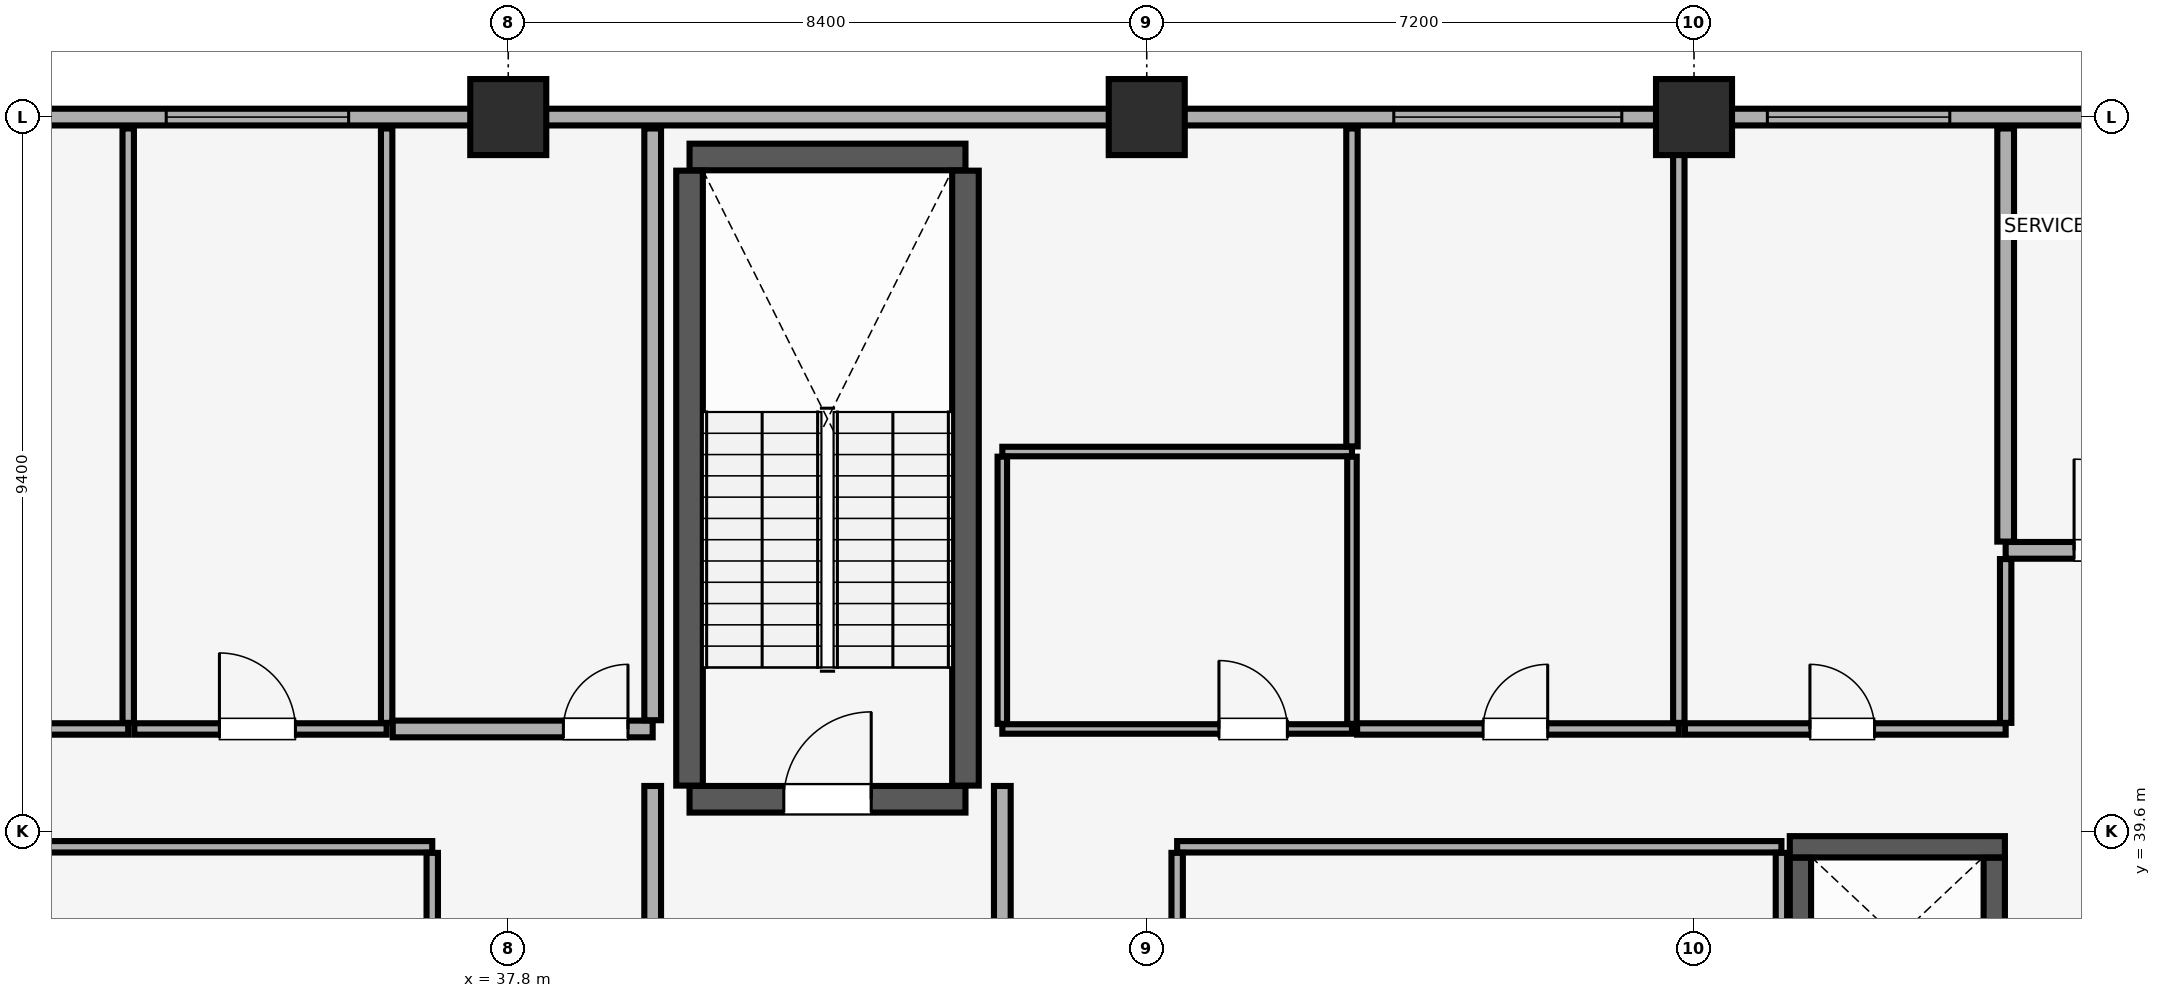
"""IFC4 building model, lengths in metres.
Left out: names, types, materials, properties, quantities, classifications, styles, units other than length and angle.
Written with IfcOpenShell. Run it as: python <this file> out.ifc"""

import sys

from ifc_helpers import new_model, si_unit, direction, frame, frame_2d, origin, origin_2d, place, context, subcontext, project, spatial, rectangle, extrude, element, fill, save


model = new_model("IFC4")
c1 = context("Model", 3, precision=1e-05, world=origin(), true_north=direction((0.0, 1.0)))
c2 = subcontext(c1, "Body", "Model", "MODEL_VIEW")
j1 = project(units=[si_unit("LENGTHUNIT", "METRE"), si_unit("PLANEANGLEUNIT", "RADIAN")], contexts=[c1])
p1 = place(None, origin())
s1 = spatial("IfcSite", under=j1, at=p1, CompositionType="ELEMENT")
p2 = place(p1, origin())
s2 = spatial("IfcBuilding", under=s1, at=p2, CompositionType="ELEMENT")
p3 = place(p2, frame((0.0, 0.0, 290.3)))
s3 = spatial("IfcBuildingStorey", under=s2, at=p3, CompositionType="ELEMENT", Elevation=290.3)
for number, where, z_axis, x_axis in (
    (1, (37.8, 49.0, 0.0), (0.0, 0.0, 1.0), (1.0, 0.0, 0.0)),
    (2, (46.2, 49.0, 0.0), (0.0, 0.0, 1.0), (1.0, 0.0, 0.0)),
    (3, (53.4, 49.0, 0.0), (0.0, 0.0, 1.0), (1.0, 0.0, 0.0)),
):
    element("IfcColumn", number, at=place(p3, frame(where, z_axis=z_axis, x_axis=x_axis)), inside=s3, PredefinedType="COLUMN", context=c2, shape_type="SweptSolid", body=[
        extrude(rectangle(XDim=1.0, YDim=1.0, at=origin_2d()), origin(), (0.0, 0.0, 1.0), 4.02),
    ])
p4 = place(p3, frame((71.4, 49.0, 0.0), z_axis=(0.0, 0.0, 1.0), x_axis=(-1.0, 0.0, 0.0)))
e4 = element("IfcWall", 4, at=p4, inside=s3, PredefinedType="SOLIDWALL", context=c2, shape_type="SweptSolid", body=[
    extrude(rectangle(XDim=58.8, YDim=0.22, at=frame_2d((29.4, 0.0))), origin(), (0.0, 0.0, 1.0), 3.22),
])
p5 = place(p4, frame((56.365, 0.0, 0.85)))
e5 = element("IfcOpeningElement", 5, at=p5, cuts=e4, PredefinedType="OPENING", context=c2, shape_type="SweptSolid", body=[
    extrude(rectangle(XDim=1.5, YDim=1.4, at=frame_2d((0.75, 0.7))), frame((0.0, 0.12, 0.0), z_axis=(0.0, -1.0, 0.0), x_axis=(1.0, 0.0, 0.0)), (0.0, 0.0, 1.0), 0.24),
])
p6 = place(p4, frame((0.935, 0.0, 0.85)))
e6 = element("IfcOpeningElement", 6, at=p6, cuts=e4, PredefinedType="OPENING", context=c2, shape_type="SweptSolid", body=[
    extrude(rectangle(XDim=1.5, YDim=1.4, at=frame_2d((0.75, 0.7))), frame((0.0, 0.12, 0.0), z_axis=(0.0, -1.0, 0.0), x_axis=(1.0, 0.0, 0.0)), (0.0, 0.0, 1.0), 0.24),
])
p7 = place(p4, frame((41.915, 0.0, 0.9)))
e7 = element("IfcOpeningElement", 7, at=p7, cuts=e4, PredefinedType="OPENING", context=c2, shape_type="SweptSolid", body=[
    extrude(rectangle(XDim=3.6, YDim=1.5, at=frame_2d((1.8, 0.75))), frame((0.0, 0.12, 0.0), z_axis=(0.0, -1.0, 0.0), x_axis=(1.0, 0.0, 0.0)), (0.0, 0.0, 1.0), 0.24),
])
p8 = place(p4, frame((35.7, 0.0, 0.9)))
e8 = element("IfcOpeningElement", 8, at=p8, cuts=e4, PredefinedType="OPENING", context=c2, shape_type="SweptSolid", body=[
    extrude(rectangle(XDim=2.4, YDim=1.5, at=frame_2d((1.2, 0.75))), frame((0.0, 0.12, 0.0), z_axis=(0.0, -1.0, 0.0), x_axis=(1.0, 0.0, 0.0)), (0.0, 0.0, 1.0), 0.24),
])
p9 = place(p4, frame((18.95, 0.0, 0.9)))
e9 = element("IfcOpeningElement", 9, at=p9, cuts=e4, PredefinedType="OPENING", context=c2, shape_type="SweptSolid", body=[
    extrude(rectangle(XDim=3.0, YDim=1.5, at=frame_2d((1.5, 0.75))), frame((0.0, 0.12, 0.0), z_axis=(0.0, -1.0, 0.0), x_axis=(1.0, 0.0, 0.0)), (0.0, 0.0, 1.0), 0.24),
])
p10 = place(p4, frame((14.635, 0.0, 0.9)))
e10 = element("IfcOpeningElement", 10, at=p10, cuts=e4, PredefinedType="OPENING", context=c2, shape_type="SweptSolid", body=[
    extrude(rectangle(XDim=2.4, YDim=1.5, at=frame_2d((1.2, 0.75))), frame((0.0, 0.12, 0.0), z_axis=(0.0, -1.0, 0.0), x_axis=(1.0, 0.0, 0.0)), (0.0, 0.0, 1.0), 0.24),
])
p11 = place(p3, frame((40.185, 40.025, 0.0), z_axis=(0.0, 0.0, 1.0), x_axis=(1.0, 0.0, 0.0)))
e11 = element("IfcWall", 11, at=p11, inside=s3, PredefinedType="SHEAR", context=c2, shape_type="SweptSolid", body=[
    extrude(rectangle(XDim=3.63, YDim=0.35, at=frame_2d((1.815, 0.0))), origin(), (0.0, 0.0, 1.0), 4.02),
])
p12 = place(p11, frame((1.24, 0.0, 0.0)))
e12 = element("IfcOpeningElement", 12, at=p12, cuts=e11, PredefinedType="OPENING", context=c2, shape_type="SweptSolid", body=[
    extrude(rectangle(XDim=1.15, YDim=2.15, at=frame_2d((0.575, 1.075))), frame((0.0, 0.185, 0.0), z_axis=(0.0, -1.0, 0.0), x_axis=(1.0, 0.0, 0.0)), (0.0, 0.0, 1.0), 0.37),
])
p13 = place(p3, frame((40.185, 48.475, 0.0), z_axis=(0.0, 0.0, 1.0), x_axis=(1.0, 0.0, 0.0)))
e13 = element("IfcWall", 13, at=p13, inside=s3, PredefinedType="SHEAR", context=c2, shape_type="SweptSolid", body=[
    extrude(rectangle(XDim=3.63, YDim=0.35, at=frame_2d((1.815, 0.0))), origin(), (0.0, 0.0, 1.0), 4.02),
])
for number, where, z_axis, x_axis in (
    (14, (40.185, 40.205, 0.0), (0.0, 0.0, 1.0), (0.0, 1.0, 0.0)),
    (15, (43.815, 40.205, 0.0), (0.0, 0.0, 1.0), (0.0, 1.0, 0.0)),
):
    element("IfcWall", number, at=place(p3, frame(where, z_axis=z_axis, x_axis=x_axis)), inside=s3, PredefinedType="SHEAR", context=c2, shape_type="SweptSolid", body=[
        extrude(rectangle(XDim=8.09, YDim=0.35, at=frame_2d((4.045, 0.0))), origin(), (0.0, 0.0, 1.0), 4.02),
    ])
p14 = place(p3, frame((54.66, 39.4, 0.0), z_axis=(0.0, 0.0, 1.0), x_axis=(1.0, 0.0, 0.0)))
e16 = element("IfcWall", 16, at=p14, inside=s3, PredefinedType="SHEAR", context=c2, shape_type="SweptSolid", body=[
    extrude(rectangle(XDim=2.83, YDim=0.28, at=frame_2d((1.415, 0.0))), origin(), (0.0, 0.0, 1.0), 4.02),
])
for number, where, z_axis, x_axis in (
    (17, (54.8, 37.145, 0.0), (0.0, 0.0, 1.0), (0.0, 1.0, 0.0)),
    (18, (57.35, 37.145, 0.0), (0.0, 0.0, 1.0), (0.0, 1.0, 0.0)),
):
    element("IfcWall", number, at=place(p3, frame(where, z_axis=z_axis, x_axis=x_axis)), inside=s3, PredefinedType="SHEAR", context=c2, shape_type="SweptSolid", body=[
        extrude(rectangle(XDim=2.11, YDim=0.28, at=frame_2d((1.055, 0.0))), origin(), (0.0, 0.0, 1.0), 4.02),
    ])
for number, where, z_axis, x_axis in (
    (19, (39.7, 34.415, 0.0), (0.0, 0.0, 1.0), (0.0, 1.0, 0.0)),
    (20, (44.3, 34.415, 0.0), (0.0, 0.0, 1.0), (0.0, 1.0, 0.0)),
):
    element("IfcWall", number, at=place(p3, frame(where, z_axis=z_axis, x_axis=x_axis)), inside=s3, PredefinedType="PARTITIONING", context=c2, shape_type="SweptSolid", body=[
        extrude(rectangle(XDim=5.785, YDim=0.22, at=frame_2d((2.893, 0.0))), origin(), (0.0, 0.0, 1.0), 4.02),
    ])
p15 = place(p3, frame((57.5, 43.3, 0.0), z_axis=(0.0, 0.0, 1.0), x_axis=(1.0, 0.0, 0.0)))
e21 = element("IfcWall", 21, at=p15, inside=s3, PredefinedType="PARTITIONING", context=c2, shape_type="SweptSolid", body=[
    extrude(rectangle(XDim=3.04, YDim=0.22, at=frame_2d((1.52, 0.0))), origin(), (0.0, 0.0, 1.0), 4.02),
])
p16 = place(p15, frame((0.9, 0.0, 0.0)))
e22 = element("IfcOpeningElement", 22, at=p16, cuts=e21, PredefinedType="OPENING", context=c2, shape_type="SweptSolid", body=[
    extrude(rectangle(XDim=1.2, YDim=2.15, at=frame_2d((0.6, 1.075))), frame((0.0, 0.12, 0.0), z_axis=(0.0, -1.0, 0.0), x_axis=(1.0, 0.0, 0.0)), (0.0, 0.0, 1.0), 0.24),
])
p17 = place(p3, frame((57.5, 43.415, 0.0), z_axis=(0.0, 0.0, 1.0), x_axis=(0.0, 1.0, 0.0)))
e23 = element("IfcWall", 23, at=p17, inside=s3, PredefinedType="PARTITIONING", context=c2, shape_type="SweptSolid", body=[
    extrude(rectangle(XDim=5.435, YDim=0.22, at=frame_2d((2.718, 0.0))), origin(), (0.0, 0.0, 1.0), 4.02),
])
p18 = place(p3, frame((31.6, 39.4, 0.0), z_axis=(0.0, 0.0, 1.0), x_axis=(1.0, 0.0, 0.0)))
e24 = element("IfcWall", 24, at=p18, inside=s3, PredefinedType="PARTITIONING", context=c2, shape_type="SweptSolid", body=[
    extrude(rectangle(XDim=5.2, YDim=0.15, at=frame_2d((2.6, 0.0))), origin(), (0.0, 0.0, 1.0), 4.02),
])
p19 = place(p3, frame((36.8, 34.38, 0.0), z_axis=(0.0, 0.0, 1.0), x_axis=(0.0, 1.0, 0.0)))
e25 = element("IfcWall", 25, at=p19, inside=s3, PredefinedType="PARTITIONING", context=c2, shape_type="SweptSolid", body=[
    extrude(rectangle(XDim=4.94, YDim=0.15, at=frame_2d((2.47, 0.0))), origin(), (0.0, 0.0, 1.0), 4.02),
])
p20 = place(p3, frame((46.6, 39.4, 0.0), z_axis=(0.0, 0.0, 1.0), x_axis=(1.0, 0.0, 0.0)))
e26 = element("IfcWall", 26, at=p20, inside=s3, PredefinedType="PARTITIONING", context=c2, shape_type="SweptSolid", body=[
    extrude(rectangle(XDim=7.95, YDim=0.15, at=frame_2d((3.975, 0.0))), origin(), (0.0, 0.0, 1.0), 4.02),
])
for number, where, z_axis, x_axis in (
    (27, (46.6, 34.38, 0.0), (0.0, 0.0, 1.0), (0.0, 1.0, 0.0)),
    (28, (54.55, 34.38, 0.0), (0.0, 0.0, 1.0), (0.0, 1.0, 0.0)),
):
    element("IfcWall", number, at=place(p3, frame(where, z_axis=z_axis, x_axis=x_axis)), inside=s3, PredefinedType="PARTITIONING", context=c2, shape_type="SweptSolid", body=[
        extrude(rectangle(XDim=4.94, YDim=0.15, at=frame_2d((2.47, 0.0))), origin(), (0.0, 0.0, 1.0), 4.02),
    ])
p21 = place(p3, frame((25.0, 40.95, 0.0), z_axis=(0.0, 0.0, 1.0), x_axis=(1.0, 0.0, 0.0)))
e29 = element("IfcWall", 29, at=p21, inside=s3, PredefinedType="PARTITIONING", context=c2, shape_type="SweptSolid", body=[
    extrude(rectangle(XDim=7.8, YDim=0.15, at=frame_2d((3.9, 0.0))), origin(), (0.0, 0.0, 1.0), 4.02),
])
p22 = place(p21, frame((3.475, 0.0, 0.0)))
e30 = element("IfcOpeningElement", 30, at=p22, cuts=e29, PredefinedType="OPENING", context=c2, shape_type="SweptSolid", body=[
    extrude(rectangle(XDim=0.85, YDim=2.1, at=frame_2d((0.425, 1.05))), frame((0.0, 0.085, 0.0), z_axis=(0.0, -1.0, 0.0), x_axis=(1.0, 0.0, 0.0)), (0.0, 0.0, 1.0), 0.17),
])
p23 = place(p3, frame((32.8, 41.03, 0.0), z_axis=(0.0, 0.0, 1.0), x_axis=(0.0, 1.0, 0.0)))
e31 = element("IfcWall", 31, at=p23, inside=s3, PredefinedType="PARTITIONING", context=c2, shape_type="SweptSolid", body=[
    extrude(rectangle(XDim=7.82, YDim=0.15, at=frame_2d((3.91, 0.0))), origin(), (0.0, 0.0, 1.0), 4.02),
])
p24 = place(p3, frame((32.88, 40.95, 0.0), z_axis=(0.0, 0.0, 1.0), x_axis=(1.0, 0.0, 0.0)))
e32 = element("IfcWall", 32, at=p24, inside=s3, PredefinedType="PARTITIONING", context=c2, shape_type="SweptSolid", body=[
    extrude(rectangle(XDim=3.32, YDim=0.15, at=frame_2d((1.66, 0.0))), origin(), (0.0, 0.0, 1.0), 4.02),
])
p25 = place(p24, frame((1.12, 0.0, 0.0)))
e33 = element("IfcOpeningElement", 33, at=p25, cuts=e32, PredefinedType="OPENING", context=c2, shape_type="SweptSolid", body=[
    extrude(rectangle(XDim=1.0, YDim=2.15, at=frame_2d((0.5, 1.075))), frame((0.0, 0.085, 0.0), z_axis=(0.0, -1.0, 0.0), x_axis=(1.0, 0.0, 0.0)), (0.0, 0.0, 1.0), 0.17),
])
p26 = place(p3, frame((36.2, 41.03, 0.0), z_axis=(0.0, 0.0, 1.0), x_axis=(0.0, 1.0, 0.0)))
e34 = element("IfcWall", 34, at=p26, inside=s3, PredefinedType="PARTITIONING", context=c2, shape_type="SweptSolid", body=[
    extrude(rectangle(XDim=7.82, YDim=0.15, at=frame_2d((3.91, 0.0))), origin(), (0.0, 0.0, 1.0), 4.02),
])
p27 = place(p3, frame((36.28, 40.95, 0.0), z_axis=(0.0, 0.0, 1.0), x_axis=(1.0, 0.0, 0.0)))
e35 = element("IfcWall", 35, at=p27, inside=s3, PredefinedType="PARTITIONING", context=c2, shape_type="SweptSolid", body=[
    extrude(rectangle(XDim=3.42, YDim=0.22, at=frame_2d((1.71, 0.0))), origin(), (0.0, 0.0, 1.0), 4.02),
])
p28 = place(p27, frame((2.245, 0.0, 0.0)))
e36 = element("IfcOpeningElement", 36, at=p28, cuts=e35, PredefinedType="OPENING", context=c2, shape_type="SweptSolid", body=[
    extrude(rectangle(XDim=0.85, YDim=2.1, at=frame_2d((0.425, 1.05))), frame((0.0, 0.12, 0.0), z_axis=(0.0, -1.0, 0.0), x_axis=(1.0, 0.0, 0.0)), (0.0, 0.0, 1.0), 0.24),
])
p29 = place(p3, frame((39.7, 41.065, 0.0), z_axis=(0.0, 0.0, 1.0), x_axis=(0.0, 1.0, 0.0)))
e37 = element("IfcWall", 37, at=p29, inside=s3, PredefinedType="PARTITIONING", context=c2, shape_type="SweptSolid", body=[
    extrude(rectangle(XDim=7.785, YDim=0.22, at=frame_2d((3.893, 0.0))), origin(), (0.0, 0.0, 1.0), 4.02),
])
p30 = place(p3, frame((44.3, 40.95, 0.0), z_axis=(0.0, 0.0, 1.0), x_axis=(1.0, 0.0, 0.0)))
e38 = element("IfcWall", 38, at=p30, inside=s3, PredefinedType="PARTITIONING", context=c2, shape_type="SweptSolid", body=[
    extrude(rectangle(XDim=4.6, YDim=0.125, at=frame_2d((2.3, 0.0))), origin(), (0.0, 0.0, 1.0), 4.02),
])
p31 = place(p30, frame((2.85, 0.0, 0.0)))
e39 = element("IfcOpeningElement", 39, at=p31, cuts=e38, PredefinedType="OPENING", context=c2, shape_type="SweptSolid", body=[
    extrude(rectangle(XDim=0.9, YDim=2.1, at=frame_2d((0.45, 1.05))), frame((0.0, 0.073, 0.0), z_axis=(0.0, -1.0, 0.0), x_axis=(1.0, 0.0, 0.0)), (0.0, 0.0, 1.0), 0.145),
])
p32 = place(p3, frame((44.3, 44.6, 0.0), z_axis=(0.0, 0.0, 1.0), x_axis=(1.0, 0.0, 0.0)))
e40 = element("IfcWall", 40, at=p32, inside=s3, PredefinedType="PARTITIONING", context=c2, shape_type="SweptSolid", body=[
    extrude(rectangle(XDim=4.6, YDim=0.125, at=frame_2d((2.3, 0.0))), origin(), (0.0, 0.0, 1.0), 4.02),
])
for number, where, z_axis, x_axis in (
    (41, (44.3, 41.018, 0.0), (0.0, 0.0, 1.0), (0.0, 1.0, 0.0)),
    (42, (48.9, 41.018, 0.0), (0.0, 0.0, 1.0), (0.0, 1.0, 0.0)),
):
    element("IfcWall", number, at=place(p3, frame(where, z_axis=z_axis, x_axis=x_axis)), inside=s3, PredefinedType="PARTITIONING", context=c2, shape_type="SweptSolid", body=[
        extrude(rectangle(XDim=3.515, YDim=0.125, at=frame_2d((1.757, 0.0))), origin(), (0.0, 0.0, 1.0), 4.02),
    ])
p33 = place(p3, frame((48.968, 40.95, 0.0), z_axis=(0.0, 0.0, 1.0), x_axis=(1.0, 0.0, 0.0)))
e43 = element("IfcWall", 43, at=p33, inside=s3, PredefinedType="PARTITIONING", context=c2, shape_type="SweptSolid", body=[
    extrude(rectangle(XDim=4.232, YDim=0.15, at=frame_2d((2.116, 0.0))), origin(), (0.0, 0.0, 1.0), 4.02),
])
p34 = place(p33, frame((1.657, 0.0, 0.0)))
e44 = element("IfcOpeningElement", 44, at=p34, cuts=e43, PredefinedType="OPENING", context=c2, shape_type="SweptSolid", body=[
    extrude(rectangle(XDim=0.85, YDim=2.1, at=frame_2d((0.425, 1.05))), frame((0.0, 0.085, 0.0), z_axis=(0.0, -1.0, 0.0), x_axis=(1.0, 0.0, 0.0)), (0.0, 0.0, 1.0), 0.17),
])
p35 = place(p3, frame((48.9, 44.667, 0.0), z_axis=(0.0, 0.0, 1.0), x_axis=(0.0, 1.0, 0.0)))
e45 = element("IfcWall", 45, at=p35, inside=s3, PredefinedType="PARTITIONING", context=c2, shape_type="SweptSolid", body=[
    extrude(rectangle(XDim=4.183, YDim=0.15, at=frame_2d((2.091, 0.0))), origin(), (0.0, 0.0, 1.0), 4.02),
])
p36 = place(p3, frame((53.2, 41.03, 0.0), z_axis=(0.0, 0.0, 1.0), x_axis=(0.0, 1.0, 0.0)))
e46 = element("IfcWall", 46, at=p36, inside=s3, PredefinedType="PARTITIONING", context=c2, shape_type="SweptSolid", body=[
    extrude(rectangle(XDim=7.82, YDim=0.15, at=frame_2d((3.91, 0.0))), origin(), (0.0, 0.0, 1.0), 4.02),
])
p37 = place(p3, frame((53.28, 40.95, 0.0), z_axis=(0.0, 0.0, 1.0), x_axis=(1.0, 0.0, 0.0)))
e47 = element("IfcWall", 47, at=p37, inside=s3, PredefinedType="PARTITIONING", context=c2, shape_type="SweptSolid", body=[
    extrude(rectangle(XDim=4.22, YDim=0.15, at=frame_2d((2.11, 0.0))), origin(), (0.0, 0.0, 1.0), 4.02),
])
p38 = place(p37, frame((1.645, 0.0, 0.0)))
e48 = element("IfcOpeningElement", 48, at=p38, cuts=e47, PredefinedType="OPENING", context=c2, shape_type="SweptSolid", body=[
    extrude(rectangle(XDim=0.85, YDim=2.1, at=frame_2d((0.425, 1.05))), frame((0.0, 0.085, 0.0), z_axis=(0.0, -1.0, 0.0), x_axis=(1.0, 0.0, 0.0)), (0.0, 0.0, 1.0), 0.17),
])
p39 = place(p3, frame((57.5, 41.03, 0.0), z_axis=(0.0, 0.0, 1.0), x_axis=(0.0, 1.0, 0.0)))
e49 = element("IfcWall", 49, at=p39, inside=s3, PredefinedType="PARTITIONING", context=c2, shape_type="SweptSolid", body=[
    extrude(rectangle(XDim=2.155, YDim=0.15, at=frame_2d((1.078, 0.0))), origin(), (0.0, 0.0, 1.0), 4.02),
])
p40 = place(p8, origin())
e50 = element("IfcWindow", 50, at=p40, inside=s3, PartitioningType="SINGLE_PANEL", PredefinedType="WINDOW", context=c2, shape_type="SweptSolid", body=[
    extrude(rectangle(XDim=2.4, YDim=1.5, at=frame_2d((1.2, 0.75))), frame((0.0, 0.03, 0.0), z_axis=(0.0, -1.0, 0.0), x_axis=(1.0, 0.0, 0.0)), (0.0, 0.0, 1.0), 0.06),
])
fill(e8, e50)
p41 = place(p9, origin())
e51 = element("IfcWindow", 51, at=p41, inside=s3, PartitioningType="SINGLE_PANEL", PredefinedType="WINDOW", context=c2, shape_type="SweptSolid", body=[
    extrude(rectangle(XDim=3.0, YDim=1.5, at=frame_2d((1.5, 0.75))), frame((0.0, 0.03, 0.0), z_axis=(0.0, -1.0, 0.0), x_axis=(1.0, 0.0, 0.0)), (0.0, 0.0, 1.0), 0.06),
])
fill(e9, e51)
p42 = place(p10, origin())
e52 = element("IfcWindow", 52, at=p42, inside=s3, PartitioningType="SINGLE_PANEL", PredefinedType="WINDOW", context=c2, shape_type="SweptSolid", body=[
    extrude(rectangle(XDim=2.4, YDim=1.5, at=frame_2d((1.2, 0.75))), frame((0.0, 0.03, 0.0), z_axis=(0.0, -1.0, 0.0), x_axis=(1.0, 0.0, 0.0)), (0.0, 0.0, 1.0), 0.06),
])
fill(e10, e52)
p43 = place(p12, origin())
e53 = element("IfcDoor", 53, at=p43, inside=s3, OperationType="SINGLE_SWING_RIGHT", PredefinedType="DOOR", context=c2, shape_type="SweptSolid", body=[
    extrude(rectangle(XDim=1.15, YDim=2.15, at=frame_2d((0.575, 1.075))), frame((0.0, 0.025, 0.0), z_axis=(0.0, -1.0, 0.0), x_axis=(1.0, 0.0, 0.0)), (0.0, 0.0, 1.0), 0.05),
])
fill(e12, e53)
p44 = place(p16, origin())
e54 = element("IfcDoor", 54, at=p44, inside=s3, OperationType="SINGLE_SWING_LEFT", PredefinedType="DOOR", context=c2, shape_type="SweptSolid", body=[
    extrude(rectangle(XDim=1.2, YDim=2.15, at=frame_2d((0.6, 1.075))), frame((0.0, 0.025, 0.0), z_axis=(0.0, -1.0, 0.0), x_axis=(1.0, 0.0, 0.0)), (0.0, 0.0, 1.0), 0.05),
])
fill(e22, e54)
p45 = place(p25, origin())
e55 = element("IfcDoor", 55, at=p45, inside=s3, OperationType="SINGLE_SWING_LEFT", PredefinedType="DOOR", context=c2, shape_type="SweptSolid", body=[
    extrude(rectangle(XDim=1.0, YDim=2.15, at=frame_2d((0.5, 1.075))), frame((0.0, 0.025, 0.0), z_axis=(0.0, -1.0, 0.0), x_axis=(1.0, 0.0, 0.0)), (0.0, 0.0, 1.0), 0.05),
])
fill(e33, e55)
p46 = place(p28, origin())
e56 = element("IfcDoor", 56, at=p46, inside=s3, OperationType="SINGLE_SWING_RIGHT", PredefinedType="DOOR", context=c2, shape_type="SweptSolid", body=[
    extrude(rectangle(XDim=0.85, YDim=2.1, at=frame_2d((0.425, 1.05))), frame((0.0, 0.025, 0.0), z_axis=(0.0, -1.0, 0.0), x_axis=(1.0, 0.0, 0.0)), (0.0, 0.0, 1.0), 0.05),
])
fill(e36, e56)
p47 = place(p31, origin())
e57 = element("IfcDoor", 57, at=p47, inside=s3, OperationType="SINGLE_SWING_LEFT", PredefinedType="DOOR", context=c2, shape_type="SweptSolid", body=[
    extrude(rectangle(XDim=0.9, YDim=2.1, at=frame_2d((0.45, 1.05))), frame((0.0, 0.025, 0.0), z_axis=(0.0, -1.0, 0.0), x_axis=(1.0, 0.0, 0.0)), (0.0, 0.0, 1.0), 0.05),
])
fill(e39, e57)
p48 = place(p34, origin())
e58 = element("IfcDoor", 58, at=p48, inside=s3, OperationType="SINGLE_SWING_RIGHT", PredefinedType="DOOR", context=c2, shape_type="SweptSolid", body=[
    extrude(rectangle(XDim=0.85, YDim=2.1, at=frame_2d((0.425, 1.05))), frame((0.0, 0.025, 0.0), z_axis=(0.0, -1.0, 0.0), x_axis=(1.0, 0.0, 0.0)), (0.0, 0.0, 1.0), 0.05),
])
fill(e44, e58)
p49 = place(p38, origin())
e59 = element("IfcDoor", 59, at=p49, inside=s3, OperationType="SINGLE_SWING_LEFT", PredefinedType="DOOR", context=c2, shape_type="SweptSolid", body=[
    extrude(rectangle(XDim=0.85, YDim=2.1, at=frame_2d((0.425, 1.05))), frame((0.0, 0.025, 0.0), z_axis=(0.0, -1.0, 0.0), x_axis=(1.0, 0.0, 0.0)), (0.0, 0.0, 1.0), 0.05),
])
fill(e48, e59)
save(model, sys.argv[1])
